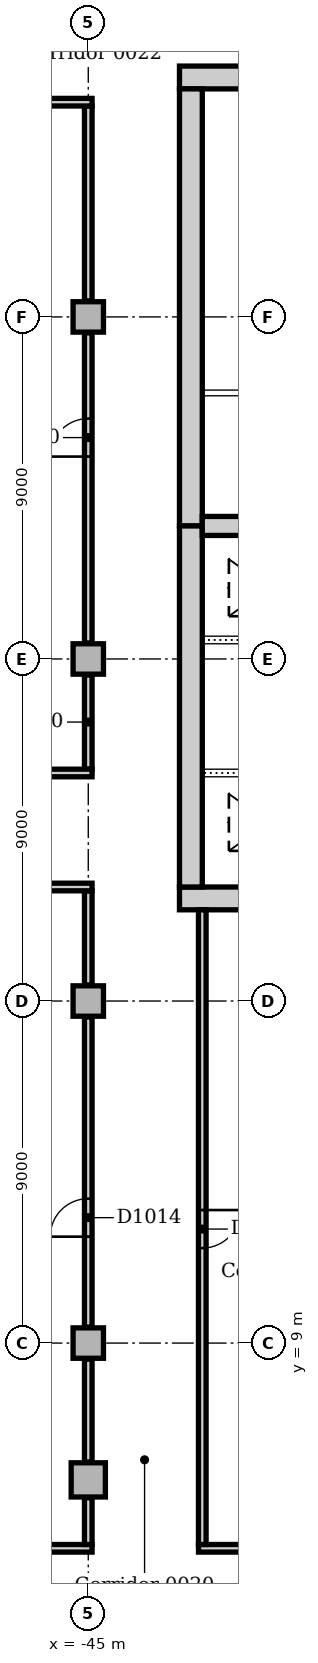
"""IFC4 building model, lengths in metres.
Left out: names, types, materials, properties, quantities, classifications, styles, units other than length and angle.
Written with IfcOpenShell. Run it as: python <this file> out.ifc"""

import sys

from ifc_helpers import new_model, si_unit, direction, frame, frame_2d, origin, origin_2d, place, context, subcontext, project, spatial, rectangle, extrude, element, fill, save


model = new_model("IFC4")
c1 = context("Model", 3, precision=1e-05, world=origin(), true_north=direction((0.0, 1.0)))
c2 = subcontext(c1, "Body", "Model", "MODEL_VIEW")
j1 = project(units=[si_unit("LENGTHUNIT", "METRE"), si_unit("PLANEANGLEUNIT", "RADIAN")], contexts=[c1])
p1 = place(None, origin())
s1 = spatial("IfcSite", under=j1, at=p1, CompositionType="ELEMENT")
p2 = place(p1, origin())
s2 = spatial("IfcBuilding", under=s1, at=p2, CompositionType="ELEMENT")
p3 = place(p2, origin())
s3 = spatial("IfcBuildingStorey", under=s2, at=p3, CompositionType="ELEMENT", Elevation=0.0)
for number, where, z_axis, x_axis in (
    (1, (-42.6, 20.7, 0.0), (0.0, 0.0, 1.0), (1.0, 0.0, 0.0)),
    (2, (-30.9, 42.3, 0.0), (0.0, 0.0, 1.0), (-1.0, 0.0, 0.0)),
):
    element("IfcWall", number, at=place(p3, frame(where, z_axis=z_axis, x_axis=x_axis)), inside=s3, PredefinedType="SOLIDWALL", context=c2, shape_type="SweptSolid", body=[
        extrude(rectangle(XDim=11.7, YDim=0.6, at=frame_2d((5.85, 0.0))), origin(), (0.0, 0.0, 1.0), 6.0),
    ])
p4 = place(p3, frame((-42.3, 42.0, 0.0), z_axis=(0.0, 0.0, 1.0), x_axis=(0.0, -1.0, 0.0)))
e3 = element("IfcWall", 3, at=p4, inside=s3, PredefinedType="SOLIDWALL", context=c2, shape_type="SweptSolid", body=[
    extrude(rectangle(XDim=11.5, YDim=0.6, at=frame_2d((5.75, 0.0))), origin(), (0.0, 0.0, 1.0), 6.0),
])
p5 = place(p4, frame((8.85, 0.0, 0.0)))
e4 = element("IfcOpeningElement", 4, at=p5, cuts=e3, PredefinedType="OPENING", context=c2, shape_type="SweptSolid", body=[
    extrude(rectangle(XDim=1.8, YDim=2.1, at=frame_2d((0.9, 1.05))), frame((0.0, 0.31, 0.0), z_axis=(0.0, -1.0, 0.0), x_axis=(1.0, 0.0, 0.0)), (0.0, 0.0, 1.0), 0.62),
])
p6 = place(p3, frame((-42.3, 30.5, 0.0), z_axis=(0.0, 0.0, 1.0), x_axis=(0.0, -1.0, 0.0)))
e5 = element("IfcWall", 5, at=p6, inside=s3, PredefinedType="SOLIDWALL", context=c2, shape_type="SweptSolid", body=[
    extrude(rectangle(XDim=9.5, YDim=0.6, at=frame_2d((4.75, 0.0))), origin(), (0.0, 0.0, 1.0), 6.0),
])
p7 = place(p6, frame((3.85, 0.0, 0.0)))
e6 = element("IfcOpeningElement", 6, at=p7, cuts=e5, PredefinedType="OPENING", context=c2, shape_type="SweptSolid", body=[
    extrude(rectangle(XDim=1.8, YDim=2.1, at=frame_2d((0.9, 1.05))), frame((0.0, 0.31, 0.0), z_axis=(0.0, -1.0, 0.0), x_axis=(1.0, 0.0, 0.0)), (0.0, 0.0, 1.0), 0.62),
])
p8 = place(p3, frame((-42.0, 30.5, 0.0), z_axis=(0.0, 0.0, 1.0), x_axis=(1.0, 0.0, 0.0)))
e7 = element("IfcWall", 7, at=p8, inside=s3, PredefinedType="SOLIDWALL", context=c2, shape_type="SweptSolid", body=[
    extrude(rectangle(XDim=10.5, YDim=0.5, at=frame_2d((5.25, 0.0))), origin(), (0.0, 0.0, 1.0), 6.0),
])
p9 = place(p3, frame((-45.0, 5.4, 0.0), z_axis=(0.0, 0.0, 1.0), x_axis=(1.0, 0.0, 0.0)))
e8 = element("IfcColumn", 8, at=p9, inside=s3, PredefinedType="COLUMN", context=c2, shape_type="SweptSolid", body=[
    extrude(rectangle(XDim=0.9, YDim=0.9, at=origin_2d()), origin(), (0.0, 0.0, 1.0), 5.7),
])
for number, where, z_axis, x_axis in (
    (9, (-45.0, 9.0, 0.0), (0.0, 0.0, 1.0), (1.0, 0.0, 0.0)),
    (10, (-45.0, 18.0, 0.0), (0.0, 0.0, 1.0), (1.0, 0.0, 0.0)),
    (11, (-45.0, 27.0, 0.0), (0.0, 0.0, 1.0), (1.0, 0.0, 0.0)),
    (12, (-45.0, 36.0, 0.0), (0.0, 0.0, 1.0), (1.0, 0.0, 0.0)),
):
    element("IfcColumn", number, at=place(p3, frame(where, z_axis=z_axis, x_axis=x_axis)), inside=s3, PredefinedType="COLUMN", context=c2, shape_type="SweptSolid", body=[
        extrude(rectangle(XDim=0.8, YDim=0.8, at=origin_2d()), origin(), (0.0, 0.0, 1.0), 5.7),
    ])
p10 = place(p3, frame((-54.0, 3.6, 0.0), z_axis=(0.0, 0.0, 1.0), x_axis=(1.0, 0.0, 0.0)))
e13 = element("IfcWall", 13, at=p10, inside=s3, PredefinedType="PARTITIONING", context=c2, shape_type="SweptSolid", body=[
    extrude(rectangle(XDim=9.1, YDim=0.2, at=frame_2d((4.55, 0.0))), origin(), (0.0, 0.0, 1.0), 5.7),
])
p11 = place(p3, frame((-42.1, 3.6, 0.0), z_axis=(0.0, 0.0, 1.0), x_axis=(1.0, 0.0, 0.0)))
e14 = element("IfcWall", 14, at=p11, inside=s3, PredefinedType="PARTITIONING", context=c2, shape_type="SweptSolid", body=[
    extrude(rectangle(XDim=6.1, YDim=0.2, at=frame_2d((3.05, 0.0))), origin(), (0.0, 0.0, 1.0), 5.7),
])
p12 = place(p3, frame((-45.0, 3.7, 0.0), z_axis=(0.0, 0.0, 1.0), x_axis=(0.0, 1.0, 0.0)))
e15 = element("IfcWall", 15, at=p12, inside=s3, PredefinedType="PARTITIONING", context=c2, shape_type="SweptSolid", body=[
    extrude(rectangle(XDim=1.23, YDim=0.2, at=frame_2d((0.615, 0.0))), origin(), (0.0, 0.0, 1.0), 5.7),
])
p13 = place(p3, frame((-45.0, 5.87, 0.0), z_axis=(0.0, 0.0, 1.0), x_axis=(0.0, 1.0, 0.0)))
e16 = element("IfcWall", 16, at=p13, inside=s3, PredefinedType="PARTITIONING", context=c2, shape_type="SweptSolid", body=[
    extrude(rectangle(XDim=2.71, YDim=0.2, at=frame_2d((1.355, 0.0))), origin(), (0.0, 0.0, 1.0), 5.7),
])
p14 = place(p3, frame((-45.0, 9.42, 0.0), z_axis=(0.0, 0.0, 1.0), x_axis=(0.0, 1.0, 0.0)))
e17 = element("IfcWall", 17, at=p14, inside=s3, PredefinedType="PARTITIONING", context=c2, shape_type="SweptSolid", body=[
    extrude(rectangle(XDim=8.16, YDim=0.2, at=frame_2d((4.08, 0.0))), origin(), (0.0, 0.0, 1.0), 5.7),
])
p15 = place(p14, frame((2.38, 0.0, 0.0)))
e18 = element("IfcOpeningElement", 18, at=p15, cuts=e17, PredefinedType="OPENING", context=c2, shape_type="SweptSolid", body=[
    extrude(rectangle(XDim=1.0, YDim=2.1, at=frame_2d((0.5, 1.05))), frame((0.0, 0.11, 0.0), z_axis=(0.0, -1.0, 0.0), x_axis=(1.0, 0.0, 0.0)), (0.0, 0.0, 1.0), 0.22),
])
p16 = place(p3, frame((-45.0, 18.42, 0.0), z_axis=(0.0, 0.0, 1.0), x_axis=(0.0, 1.0, 0.0)))
e19 = element("IfcWall", 19, at=p16, inside=s3, PredefinedType="PARTITIONING", context=c2, shape_type="SweptSolid", body=[
    extrude(rectangle(XDim=2.48, YDim=0.2, at=frame_2d((1.24, 0.0))), origin(), (0.0, 0.0, 1.0), 5.7),
])
p17 = place(p3, frame((-42.0, 3.7, 0.0), z_axis=(0.0, 0.0, 1.0), x_axis=(0.0, 1.0, 0.0)))
e20 = element("IfcWall", 20, at=p17, inside=s3, PredefinedType="PARTITIONING", context=c2, shape_type="SweptSolid", body=[
    extrude(rectangle(XDim=16.7, YDim=0.2, at=frame_2d((8.35, 0.0))), origin(), (0.0, 0.0, 1.0), 5.7),
])
p18 = place(p17, frame((7.8, 0.0, 0.0)))
e21 = element("IfcOpeningElement", 21, at=p18, cuts=e20, PredefinedType="OPENING", context=c2, shape_type="SweptSolid", body=[
    extrude(rectangle(XDim=1.0, YDim=2.1, at=frame_2d((0.5, 1.05))), frame((0.0, 0.11, 0.0), z_axis=(0.0, -1.0, 0.0), x_axis=(1.0, 0.0, 0.0)), (0.0, 0.0, 1.0), 0.22),
])
p19 = place(p3, frame((-45.0, 24.1, 0.0), z_axis=(0.0, 0.0, 1.0), x_axis=(0.0, 1.0, 0.0)))
e22 = element("IfcWall", 22, at=p19, inside=s3, PredefinedType="PARTITIONING", context=c2, shape_type="SweptSolid", body=[
    extrude(rectangle(XDim=2.48, YDim=0.2, at=frame_2d((1.24, 0.0))), origin(), (0.0, 0.0, 1.0), 5.7),
])
p20 = place(p3, frame((-45.0, 27.42, 0.0), z_axis=(0.0, 0.0, 1.0), x_axis=(0.0, 1.0, 0.0)))
e23 = element("IfcWall", 23, at=p20, inside=s3, PredefinedType="PARTITIONING", context=c2, shape_type="SweptSolid", body=[
    extrude(rectangle(XDim=8.16, YDim=0.2, at=frame_2d((4.08, 0.0))), origin(), (0.0, 0.0, 1.0), 5.7),
])
p21 = place(p20, frame((4.905, 0.0, 0.0)))
e24 = element("IfcOpeningElement", 24, at=p21, cuts=e23, PredefinedType="OPENING", context=c2, shape_type="SweptSolid", body=[
    extrude(rectangle(XDim=1.0, YDim=2.1, at=frame_2d((0.5, 1.05))), frame((0.0, 0.11, 0.0), z_axis=(0.0, -1.0, 0.0), x_axis=(1.0, 0.0, 0.0)), (0.0, 0.0, 1.0), 0.22),
])
p22 = place(p3, frame((-45.0, 36.42, 0.0), z_axis=(0.0, 0.0, 1.0), x_axis=(0.0, 1.0, 0.0)))
e25 = element("IfcWall", 25, at=p22, inside=s3, PredefinedType="PARTITIONING", context=c2, shape_type="SweptSolid", body=[
    extrude(rectangle(XDim=5.13, YDim=0.2, at=frame_2d((2.565, 0.0))), origin(), (0.0, 0.0, 1.0), 5.7),
])
p23 = place(p3, frame((-54.0, 21.0, 0.0), z_axis=(0.0, 0.0, 1.0), x_axis=(1.0, 0.0, 0.0)))
e26 = element("IfcWall", 26, at=p23, inside=s3, PredefinedType="PARTITIONING", context=c2, shape_type="SweptSolid", body=[
    extrude(rectangle(XDim=9.1, YDim=0.2, at=frame_2d((4.55, 0.0))), origin(), (0.0, 0.0, 1.0), 5.7),
])
for number, where, z_axis, x_axis in (
    (27, (-52.5, 24.0, 0.0), (0.0, 0.0, 1.0), (1.0, 0.0, 0.0)),
    (28, (-52.5, 41.65, 0.0), (0.0, 0.0, 1.0), (1.0, 0.0, 0.0)),
):
    element("IfcWall", number, at=place(p3, frame(where, z_axis=z_axis, x_axis=x_axis)), inside=s3, PredefinedType="PARTITIONING", context=c2, shape_type="SweptSolid", body=[
        extrude(rectangle(XDim=7.6, YDim=0.2, at=frame_2d((3.8, 0.0))), origin(), (0.0, 0.0, 1.0), 5.7),
    ])
p24 = place(p3, frame((-38.6, 24.0, 0.0), z_axis=(0.0, 0.0, 1.0), x_axis=(-1.0, 0.0, 0.0)))
e29 = element("IfcWall", 29, at=p24, inside=s3, PredefinedType="SOLIDWALL", context=c2, shape_type="SweptSolid", body=[
    extrude(rectangle(XDim=3.4, YDim=0.2, at=frame_2d((1.7, 0.0))), origin(), (0.0, 0.0, 1.0), 6.0),
])
p25 = place(p24, frame((0.8, 0.0, 0.0)))
e30 = element("IfcOpeningElement", 30, at=p25, cuts=e29, PredefinedType="OPENING", context=c2, shape_type="SweptSolid", body=[
    extrude(rectangle(XDim=1.1, YDim=2.1, at=frame_2d((0.55, 1.05))), frame((0.0, 0.11, 0.0), z_axis=(0.0, -1.0, 0.0), x_axis=(1.0, 0.0, 0.0)), (0.0, 0.0, 1.0), 0.22),
])
p26 = place(p3, frame((-42.0, 27.5, 0.0), z_axis=(0.0, 0.0, 1.0), x_axis=(1.0, 0.0, 0.0)))
e31 = element("IfcWall", 31, at=p26, inside=s3, PredefinedType="SOLIDWALL", context=c2, shape_type="SweptSolid", body=[
    extrude(rectangle(XDim=3.4, YDim=0.2, at=frame_2d((1.7, 0.0))), origin(), (0.0, 0.0, 1.0), 6.0),
])
p27 = place(p26, frame((1.5, 0.0, 0.0)))
e32 = element("IfcOpeningElement", 32, at=p27, cuts=e31, PredefinedType="OPENING", context=c2, shape_type="SweptSolid", body=[
    extrude(rectangle(XDim=1.1, YDim=2.1, at=frame_2d((0.55, 1.05))), frame((0.0, 0.11, 0.0), z_axis=(0.0, -1.0, 0.0), x_axis=(1.0, 0.0, 0.0)), (0.0, 0.0, 1.0), 0.22),
])
p28 = place(p3, frame((-39.325, 34.0, 0.0), z_axis=(0.0, 0.0, 1.0), x_axis=(-1.0, 0.0, 0.0)))
e33 = element("IfcWall", 33, at=p28, inside=s3, PredefinedType="PARTITIONING", context=c2, shape_type="SweptSolid", body=[
    extrude(rectangle(XDim=2.675, YDim=0.15, at=frame_2d((1.337, 0.0))), origin(), (0.0, 0.0, 1.0), 5.7),
])
p29 = place(p28, frame((0.975, 0.0, 0.0)))
e34 = element("IfcOpeningElement", 34, at=p29, cuts=e33, PredefinedType="OPENING", context=c2, shape_type="SweptSolid", body=[
    extrude(rectangle(XDim=0.8, YDim=2.1, at=frame_2d((0.4, 1.05))), frame((0.0, 0.085, 0.0), z_axis=(0.0, -1.0, 0.0), x_axis=(1.0, 0.0, 0.0)), (0.0, 0.0, 1.0), 0.17),
])
p30 = place(p15, origin())
e35 = element("IfcDoor", 35, at=p30, inside=s3, OperationType="SINGLE_SWING_LEFT", PredefinedType="DOOR", context=c2, shape_type="SweptSolid", body=[
    extrude(rectangle(XDim=1.0, YDim=2.1, at=frame_2d((0.5, 1.05))), frame((0.0, 0.025, 0.0), z_axis=(0.0, -1.0, 0.0), x_axis=(1.0, 0.0, 0.0)), (0.0, 0.0, 1.0), 0.05),
])
fill(e18, e35)
p31 = place(p18, frame((1.0, 0.0, 0.0), z_axis=(0.0, 0.0, 1.0), x_axis=(-1.0, 0.0, 0.0)))
e36 = element("IfcDoor", 36, at=p31, inside=s3, OperationType="SINGLE_SWING_LEFT", PredefinedType="DOOR", context=c2, shape_type="SweptSolid", body=[
    extrude(rectangle(XDim=1.0, YDim=2.1, at=frame_2d((0.5, 1.05))), frame((0.0, 0.025, 0.0), z_axis=(0.0, -1.0, 0.0), x_axis=(1.0, 0.0, 0.0)), (0.0, 0.0, 1.0), 0.05),
])
fill(e21, e36)
p32 = place(p21, origin())
e37 = element("IfcDoor", 37, at=p32, inside=s3, OperationType="SINGLE_SWING_LEFT", PredefinedType="DOOR", context=c2, shape_type="SweptSolid", body=[
    extrude(rectangle(XDim=1.0, YDim=2.1, at=frame_2d((0.5, 1.05))), frame((0.0, 0.025, 0.0), z_axis=(0.0, -1.0, 0.0), x_axis=(1.0, 0.0, 0.0)), (0.0, 0.0, 1.0), 0.05),
])
fill(e24, e37)
p33 = place(p7, origin())
e38 = element("IfcDoor", 38, at=p33, inside=s3, OperationType="DOUBLE_DOOR_SINGLE_SWING", PredefinedType="DOOR", context=c2, shape_type="SweptSolid", body=[
    extrude(rectangle(XDim=1.8, YDim=2.1, at=frame_2d((0.9, 1.05))), frame((0.0, 0.025, 0.0), z_axis=(0.0, -1.0, 0.0), x_axis=(1.0, 0.0, 0.0)), (0.0, 0.0, 1.0), 0.05),
])
fill(e6, e38)
p34 = place(p5, frame((1.8, 0.0, 0.0), z_axis=(0.0, 0.0, 1.0), x_axis=(-1.0, 0.0, 0.0)))
e39 = element("IfcDoor", 39, at=p34, inside=s3, OperationType="DOUBLE_DOOR_SINGLE_SWING", PredefinedType="DOOR", context=c2, shape_type="SweptSolid", body=[
    extrude(rectangle(XDim=1.8, YDim=2.1, at=frame_2d((0.9, 1.05))), frame((0.0, 0.025, 0.0), z_axis=(0.0, -1.0, 0.0), x_axis=(1.0, 0.0, 0.0)), (0.0, 0.0, 1.0), 0.05),
])
fill(e4, e39)
p35 = place(p29, frame((0.8, 0.0, 0.0), z_axis=(0.0, 0.0, 1.0), x_axis=(-1.0, 0.0, 0.0)))
e40 = element("IfcDoor", 40, at=p35, inside=s3, OperationType="SINGLE_SWING_RIGHT", PredefinedType="DOOR", context=c2, shape_type="SweptSolid", body=[
    extrude(rectangle(XDim=0.8, YDim=2.1, at=frame_2d((0.4, 1.05))), frame((0.0, 0.025, 0.0), z_axis=(0.0, -1.0, 0.0), x_axis=(1.0, 0.0, 0.0)), (0.0, 0.0, 1.0), 0.05),
])
fill(e34, e40)
save(model, sys.argv[1])
